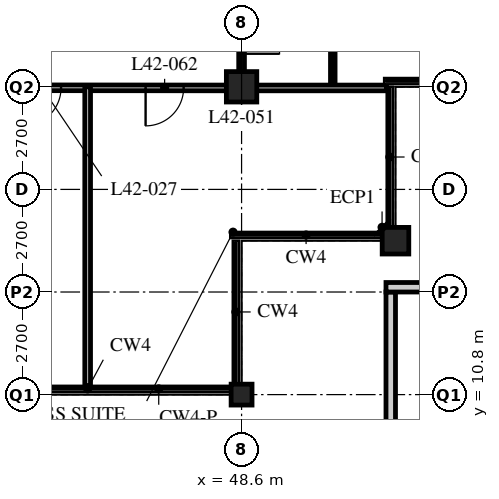
"""IFC4 building model, lengths in metres.
Left out: names, types, materials, properties, quantities, classifications, styles, units other than length and angle.
Written with IfcOpenShell. Run it as: python <this file> out.ifc"""

import sys

from ifc_helpers import new_model, si_unit, direction, frame, frame_2d, origin, origin_2d, place, context, subcontext, project, spatial, rectangle, hollow_rectangle, extrude, element, fill, save


model = new_model("IFC4")
c1 = context("Model", 3, precision=1e-05, world=origin(), true_north=direction((0.0, 1.0)))
c2 = subcontext(c1, "Body", "Model", "MODEL_VIEW")
j1 = project(units=[si_unit("LENGTHUNIT", "METRE"), si_unit("PLANEANGLEUNIT", "RADIAN")], contexts=[c1])
p1 = place(None, origin())
s1 = spatial("IfcSite", under=j1, at=p1, CompositionType="ELEMENT")
p2 = place(p1, origin())
s2 = spatial("IfcBuilding", under=s1, at=p2, CompositionType="ELEMENT")
p3 = place(p2, frame((0.0, 0.0, 165.0)))
s3 = spatial("IfcBuildingStorey", under=s2, at=p3, CompositionType="ELEMENT", Elevation=165.0)
p4 = place(p3, frame((48.6, 10.8, 0.0), z_axis=(0.0, 0.0, 1.0), x_axis=(1.0, 0.0, 0.0)))
e1 = element("IfcColumn", 1, at=p4, inside=s3, PredefinedType="COLUMN", context=c2, shape_type="SweptSolid", body=[
    extrude(hollow_rectangle(XDim=0.55, YDim=0.55, WallThickness=0.04, at=origin_2d()), origin(), (0.0, 0.0, 1.0), 5.4),
])
p5 = place(p3, frame((48.6, 18.9, 0.0), z_axis=(0.0, 0.0, 1.0), x_axis=(1.0, 0.0, 0.0)))
e2 = element("IfcColumn", 2, at=p5, inside=s3, PredefinedType="COLUMN", context=c2, shape_type="SweptSolid", body=[
    extrude(hollow_rectangle(XDim=0.8, YDim=0.8, WallThickness=0.08, at=origin_2d()), origin(), (0.0, 0.0, 1.0), 5.4),
])
p6 = place(p3, frame((52.65, 14.85, 0.0), z_axis=(0.0, 0.0, 1.0), x_axis=(1.0, 0.0, 0.0)))
e3 = element("IfcColumn", 3, at=p6, inside=s3, PredefinedType="COLUMN", context=c2, shape_type="SweptSolid", body=[
    extrude(hollow_rectangle(XDim=0.7, YDim=0.7, WallThickness=0.07, at=origin_2d()), origin(), (0.0, 0.0, 1.0), 5.4),
])
p7 = place(p3, frame((52.525, 9.7, 0.0), z_axis=(0.0, 0.0, 1.0), x_axis=(0.0, 1.0, 0.0)))
e4 = element("IfcWall", 4, at=p7, inside=s3, PredefinedType="PARAPET", context=c2, shape_type="SweptSolid", body=[
    extrude(rectangle(XDim=3.8, YDim=0.25, at=frame_2d((1.9, 0.0))), origin(), (0.0, 0.0, 1.0), 1.38),
])
p8 = place(p3, frame((52.4, 13.625, 0.0), z_axis=(0.0, 0.0, 1.0), x_axis=(1.0, 0.0, 0.0)))
e5 = element("IfcWall", 5, at=p8, inside=s3, PredefinedType="PARAPET", context=c2, shape_type="SweptSolid", body=[
    extrude(rectangle(XDim=4.3, YDim=0.25, at=frame_2d((2.15, 0.0))), origin(), (0.0, 0.0, 1.0), 1.38),
])
p9 = place(p3, frame((8.1, 18.9, 0.0), z_axis=(0.0, 0.0, 1.0), x_axis=(0.999999729567, -0.000735435758, 0.0)))
e6 = element("IfcWall", 6, at=p9, inside=s3, PredefinedType="PARTITIONING", context=c2, shape_type="SweptSolid", body=[
    extrude(rectangle(XDim=40.5, YDim=0.15, at=frame_2d((20.25, 0.0))), origin(), (0.0, 0.0, 1.0), 4.42),
])
p10 = place(p9, frame((4.45, 0.0, 0.0)))
e7 = element("IfcOpeningElement", 7, at=p10, cuts=e6, PredefinedType="OPENING", context=c2, shape_type="SweptSolid", body=[
    extrude(rectangle(XDim=1.0, YDim=2.1, at=frame_2d((0.5, 1.05))), frame((0.0, 0.085, 0.0), z_axis=(0.0, -1.0, 0.0), x_axis=(1.0, 0.0, 0.0)), (0.0, 0.0, 1.0), 0.17),
])
p11 = place(p9, frame((25.15, 0.0, 0.0)))
e8 = element("IfcOpeningElement", 8, at=p11, cuts=e6, PredefinedType="OPENING", context=c2, shape_type="SweptSolid", body=[
    extrude(rectangle(XDim=1.8, YDim=2.4, at=frame_2d((0.9, 1.2))), frame((0.0, 0.085, 0.0), z_axis=(0.0, -1.0, 0.0), x_axis=(1.0, 0.0, 0.0)), (0.0, 0.0, 1.0), 0.17),
])
p12 = place(p9, frame((29.875, 0.0, 0.0)))
e9 = element("IfcOpeningElement", 9, at=p12, cuts=e6, PredefinedType="OPENING", context=c2, shape_type="SweptSolid", body=[
    extrude(rectangle(XDim=1.0, YDim=2.1, at=frame_2d((0.5, 1.05))), frame((0.0, 0.085, 0.0), z_axis=(0.0, -1.0, 0.0), x_axis=(1.0, 0.0, 0.0)), (0.0, 0.0, 1.0), 0.17),
])
p13 = place(p9, frame((34.75, 0.0, 0.0)))
e10 = element("IfcOpeningElement", 10, at=p13, cuts=e6, PredefinedType="OPENING", context=c2, shape_type="SweptSolid", body=[
    extrude(rectangle(XDim=1.0, YDim=2.1, at=frame_2d((0.5, 1.05))), frame((0.0, 0.085, 0.0), z_axis=(0.0, -1.0, 0.0), x_axis=(1.0, 0.0, 0.0)), (0.0, 0.0, 1.0), 0.17),
])
p14 = place(p9, frame((1.525, 0.0, 0.0)))
e11 = element("IfcOpeningElement", 11, at=p14, cuts=e6, PredefinedType="OPENING", context=c2, shape_type="SweptSolid", body=[
    extrude(rectangle(XDim=1.0, YDim=2.1, at=frame_2d((0.5, 1.05))), frame((0.0, 0.085, 0.0), z_axis=(0.0, -1.0, 0.0), x_axis=(1.0, 0.0, 0.0)), (0.0, 0.0, 1.0), 0.17),
])
p15 = place(p9, frame((37.975, 0.0, 0.0)))
e12 = element("IfcOpeningElement", 12, at=p15, cuts=e6, PredefinedType="OPENING", context=c2, shape_type="SweptSolid", body=[
    extrude(rectangle(XDim=1.0, YDim=2.1, at=frame_2d((0.5, 1.05))), frame((0.0, 0.085, 0.0), z_axis=(0.0, -1.0, 0.0), x_axis=(1.0, 0.0, 0.0)), (0.0, 0.0, 1.0), 0.17),
])
p16 = place(p3, frame((48.6, 18.87, 0.0), z_axis=(0.0, 0.0, 1.0), x_axis=(0.0, 1.0, 0.0)))
e13 = element("IfcWall", 13, at=p16, inside=s3, PredefinedType="PARTITIONING", context=c2, shape_type="SweptSolid", body=[
    extrude(rectangle(XDim=32.43, YDim=0.15, at=frame_2d((16.215, 0.0))), origin(), (0.0, 0.0, 1.0), 4.42),
])
p17 = place(p16, frame((0.9, 0.0, 0.0)))
e14 = element("IfcOpeningElement", 14, at=p17, cuts=e13, PredefinedType="OPENING", context=c2, shape_type="SweptSolid", body=[
    extrude(rectangle(XDim=1.0, YDim=2.1, at=frame_2d((0.5, 1.05))), frame((0.0, 0.085, 0.0), z_axis=(0.0, -1.0, 0.0), x_axis=(1.0, 0.0, 0.0)), (0.0, 0.0, 1.0), 0.17),
])
p18 = place(p16, frame((17.05, 0.0, 0.0)))
e15 = element("IfcOpeningElement", 15, at=p18, cuts=e13, PredefinedType="OPENING", context=c2, shape_type="SweptSolid", body=[
    extrude(rectangle(XDim=1.8, YDim=2.4, at=frame_2d((0.9, 1.2))), frame((0.0, 0.085, 0.0), z_axis=(0.0, -1.0, 0.0), x_axis=(1.0, 0.0, 0.0)), (0.0, 0.0, 1.0), 0.17),
])
p19 = place(p16, frame((20.65, 0.0, 0.0)))
e16 = element("IfcOpeningElement", 16, at=p19, cuts=e13, PredefinedType="OPENING", context=c2, shape_type="SweptSolid", body=[
    extrude(rectangle(XDim=1.0, YDim=2.1, at=frame_2d((0.5, 1.05))), frame((0.0, 0.085, 0.0), z_axis=(0.0, -1.0, 0.0), x_axis=(1.0, 0.0, 0.0)), (0.0, 0.0, 1.0), 0.17),
])
p20 = place(p16, frame((29.05, 0.0, 0.0)))
e17 = element("IfcOpeningElement", 17, at=p20, cuts=e13, PredefinedType="OPENING", context=c2, shape_type="SweptSolid", body=[
    extrude(rectangle(XDim=1.0, YDim=2.1, at=frame_2d((0.5, 1.05))), frame((0.0, 0.085, 0.0), z_axis=(0.0, -1.0, 0.0), x_axis=(1.0, 0.0, 0.0)), (0.0, 0.0, 1.0), 0.17),
])
p21 = place(p3, frame((51.0, 18.87, 0.0), z_axis=(0.0, 0.0, 1.0), x_axis=(0.0, 1.0, 0.0)))
e18 = element("IfcWall", 18, at=p21, inside=s3, PredefinedType="PARTITIONING", context=c2, shape_type="SweptSolid", body=[
    extrude(rectangle(XDim=12.18, YDim=0.12, at=frame_2d((6.09, 0.0))), origin(), (0.0, 0.0, 1.0), 5.19),
])
p22 = place(p21, frame((0.975, 0.0, 0.0)))
e19 = element("IfcOpeningElement", 19, at=p22, cuts=e18, PredefinedType="OPENING", context=c2, shape_type="SweptSolid", body=[
    extrude(rectangle(XDim=0.85, YDim=2.1, at=frame_2d((0.425, 1.05))), frame((0.0, 0.07, 0.0), z_axis=(0.0, -1.0, 0.0), x_axis=(1.0, 0.0, 0.0)), (0.0, 0.0, 1.0), 0.14),
])
p23 = place(p21, frame((8.425, 0.0, 0.0)))
e20 = element("IfcOpeningElement", 20, at=p23, cuts=e18, PredefinedType="OPENING", context=c2, shape_type="SweptSolid", body=[
    extrude(rectangle(XDim=0.85, YDim=2.1, at=frame_2d((0.425, 1.05))), frame((0.0, 0.07, 0.0), z_axis=(0.0, -1.0, 0.0), x_axis=(1.0, 0.0, 0.0)), (0.0, 0.0, 1.0), 0.14),
])
p24 = place(p3, frame((48.6, 18.87, 0.0), z_axis=(0.0, 0.0, 1.0), x_axis=(1.0, 0.0, 0.0)))
e21 = element("IfcWall", 21, at=p24, inside=s3, PredefinedType="PARTITIONING", context=c2, shape_type="SweptSolid", body=[
    extrude(rectangle(XDim=3.814, YDim=0.15, at=frame_2d((1.907, 0.0))), origin(), (0.0, 0.0, 1.0), 4.42),
])
p25 = place(p3, frame((44.55, 18.9, 0.0), z_axis=(0.0, 0.0, 1.0), x_axis=(0.0, -1.0, 0.0)))
e22 = element("IfcWall", 22, at=p25, inside=s3, PredefinedType="PARTITIONING", context=c2, shape_type="SweptSolid", body=[
    extrude(rectangle(XDim=7.865, YDim=0.15, at=frame_2d((3.932, 0.0))), origin(), (0.0, 0.0, 1.0), 5.19),
])
p26 = place(p13, origin())
e23 = element("IfcDoor", 23, at=p26, inside=s3, OperationType="SINGLE_SWING_RIGHT", PredefinedType="DOOR", context=c2, shape_type="SweptSolid", body=[
    extrude(rectangle(XDim=1.0, YDim=2.1, at=frame_2d((0.5, 1.05))), frame((0.0, 0.025, 0.0), z_axis=(0.0, -1.0, 0.0), x_axis=(1.0, 0.0, 0.0)), (0.0, 0.0, 1.0), 0.05),
])
fill(e10, e23)
p27 = place(p17, origin())
e24 = element("IfcDoor", 24, at=p27, inside=s3, OperationType="SINGLE_SWING_RIGHT", PredefinedType="DOOR", context=c2, shape_type="SweptSolid", body=[
    extrude(rectangle(XDim=1.0, YDim=2.1, at=frame_2d((0.5, 1.05))), frame((0.0, 0.025, 0.0), z_axis=(0.0, -1.0, 0.0), x_axis=(1.0, 0.0, 0.0)), (0.0, 0.0, 1.0), 0.05),
])
fill(e14, e24)
p28 = place(p15, origin())
e25 = element("IfcDoor", 25, at=p28, inside=s3, OperationType="SINGLE_SWING_RIGHT", PredefinedType="DOOR", context=c2, shape_type="SweptSolid", body=[
    extrude(rectangle(XDim=1.0, YDim=2.1, at=frame_2d((0.5, 1.05))), frame((0.0, 0.025, 0.0), z_axis=(0.0, -1.0, 0.0), x_axis=(1.0, 0.0, 0.0)), (0.0, 0.0, 1.0), 0.05),
])
fill(e12, e25)
save(model, sys.argv[1])
